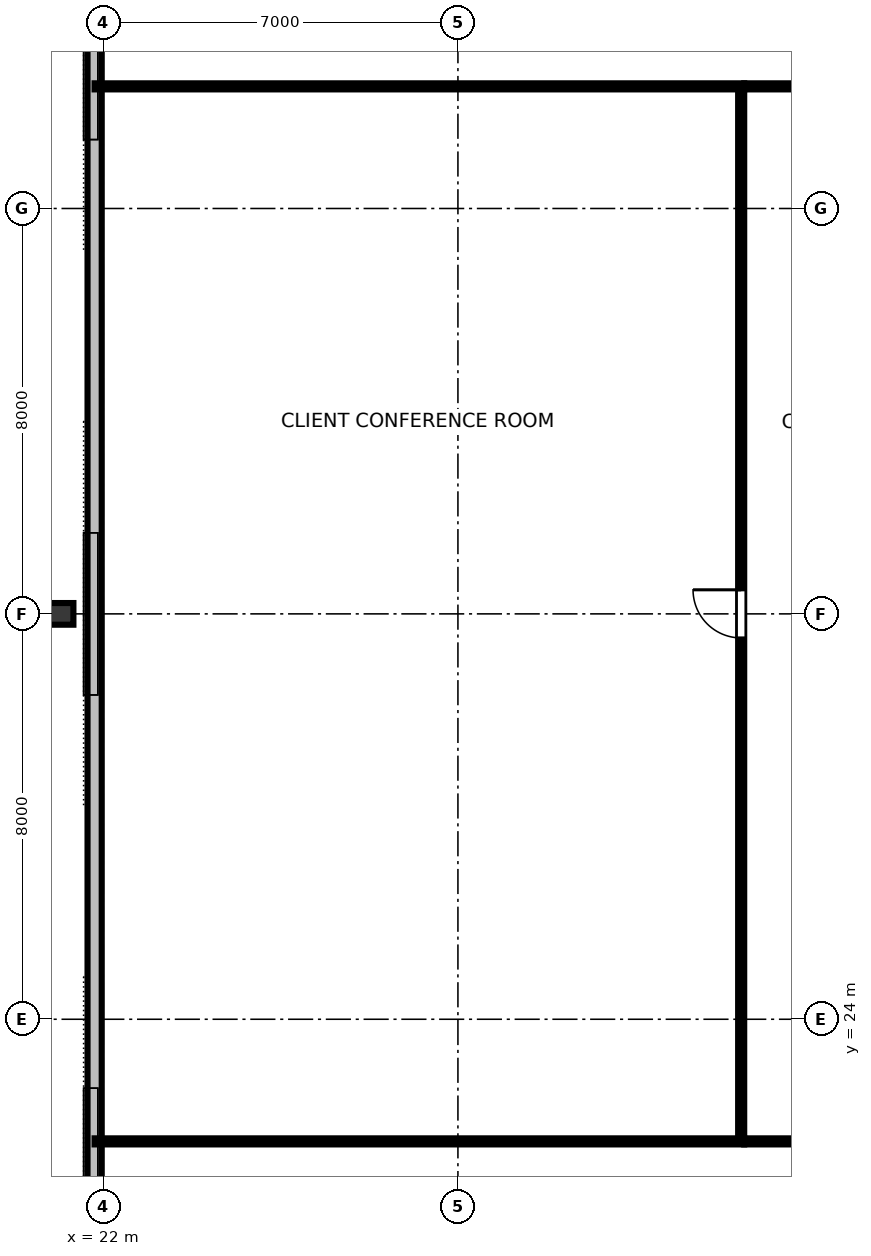
"""IFC4 building model, lengths in metres.
Left out: names, types, materials, properties, quantities, classifications, styles, units other than length and angle.
Written with IfcOpenShell. Run it as: python <this file> out.ifc"""

import sys

from ifc_helpers import new_model, si_unit, direction, frame, frame_2d, origin, origin_2d, place, context, subcontext, project, spatial, rectangle, i_section, extrude, element, fill, save


model = new_model("IFC4")
c1 = context("Model", 3, precision=1e-05, world=origin(), true_north=direction((0.0, 1.0)))
c2 = subcontext(c1, "Body", "Model", "MODEL_VIEW")
j1 = project(units=[si_unit("LENGTHUNIT", "METRE"), si_unit("PLANEANGLEUNIT", "RADIAN")], contexts=[c1])
p1 = place(None, origin())
s1 = spatial("IfcSite", under=j1, at=p1, CompositionType="ELEMENT")
p2 = place(p1, origin())
s2 = spatial("IfcBuilding", under=s1, at=p2, CompositionType="ELEMENT")
p3 = place(p2, frame((0.0, 0.0, 82.0)))
s3 = spatial("IfcBuildingStorey", under=s2, at=p3, CompositionType="ELEMENT", Elevation=82.0)
p4 = place(p3, frame((21.17, 32.0, 0.0), z_axis=(0.06599123705, 0.0, 0.997820202558), x_axis=(-0.997820202558, 0.0, 0.06599123705)))
e1 = element("IfcColumn", 1, at=p4, inside=s3, PredefinedType="COLUMN", context=c2, shape_type="SweptSolid", body=[
    extrude(i_section(OverallWidth=0.428, OverallDepth=0.483, WebThickness=0.051, FlangeThickness=0.082, FilletRadius=0.025, at=origin_2d()), origin(), (0.0, 0.0, 1.0), 3.285),
])
p5 = place(p3, frame((21.83, 49.34, 0.0), z_axis=(0.0, 0.0, 1.0), x_axis=(0.0, -1.0, 0.0)))
e2 = element("IfcWall", 2, at=p5, inside=s3, PredefinedType="STANDARD", context=c2, shape_type="SweptSolid", body=[
    extrude(rectangle(XDim=34.68, YDim=0.28, at=frame_2d((17.34, 0.0))), origin(), (0.0, 0.0, 1.0), 3.28),
])
p6 = place(p3, frame((34.65, 21.59, 0.0), z_axis=(0.0, 0.0, 1.0), x_axis=(1.0, 0.0, 0.0)))
e3 = element("IfcWall", 3, at=p6, inside=s3, PredefinedType="PARTITIONING", context=c2, shape_type="SweptSolid", body=[
    extrude(rectangle(XDim=22.7, YDim=0.12, at=frame_2d((11.35, 0.0))), origin(), (0.0, 0.0, 1.0), 2.56),
])
p7 = place(p6, frame((5.467, 0.0, 0.0)))
e4 = element("IfcOpeningElement", 4, at=p7, cuts=e3, PredefinedType="OPENING", context=c2, shape_type="SweptSolid", body=[
    extrude(rectangle(XDim=0.95, YDim=2.15, at=frame_2d((0.475, 1.075))), frame((0.0, 0.07, 0.0), z_axis=(0.0, -1.0, 0.0), x_axis=(1.0, 0.0, 0.0)), (0.0, 0.0, 1.0), 0.14),
])
p8 = place(p6, frame((14.188, 0.0, 0.0)))
e5 = element("IfcOpeningElement", 5, at=p8, cuts=e3, PredefinedType="OPENING", context=c2, shape_type="SweptSolid", body=[
    extrude(rectangle(XDim=0.95, YDim=2.15, at=frame_2d((0.475, 1.075))), frame((0.0, 0.07, 0.0), z_axis=(0.0, -1.0, 0.0), x_axis=(1.0, 0.0, 0.0)), (0.0, 0.0, 1.0), 0.14),
])
p9 = place(p6, frame((19.596, 0.0, 0.0)))
e6 = element("IfcOpeningElement", 6, at=p9, cuts=e3, PredefinedType="OPENING", context=c2, shape_type="SweptSolid", body=[
    extrude(rectangle(XDim=0.95, YDim=2.15, at=frame_2d((0.475, 1.075))), frame((0.0, 0.07, 0.0), z_axis=(0.0, -1.0, 0.0), x_axis=(1.0, 0.0, 0.0)), (0.0, 0.0, 1.0), 0.14),
])
p10 = place(p3, frame((34.65, 42.41, 0.0), z_axis=(0.0, 0.0, 1.0), x_axis=(1.0, 0.0, 0.0)))
e7 = element("IfcWall", 7, at=p10, inside=s3, PredefinedType="PARTITIONING", context=c2, shape_type="SweptSolid", body=[
    extrude(rectangle(XDim=22.7, YDim=0.12, at=frame_2d((11.35, 0.0))), origin(), (0.0, 0.0, 1.0), 2.56),
])
p11 = place(p10, frame((2.505, 0.0, 0.0)))
e8 = element("IfcOpeningElement", 8, at=p11, cuts=e7, PredefinedType="OPENING", context=c2, shape_type="SweptSolid", body=[
    extrude(rectangle(XDim=0.95, YDim=2.15, at=frame_2d((0.475, 1.075))), frame((0.0, 0.07, 0.0), z_axis=(0.0, -1.0, 0.0), x_axis=(1.0, 0.0, 0.0)), (0.0, 0.0, 1.0), 0.14),
])
p12 = place(p10, frame((7.357, 0.0, 0.0)))
e9 = element("IfcOpeningElement", 9, at=p12, cuts=e7, PredefinedType="OPENING", context=c2, shape_type="SweptSolid", body=[
    extrude(rectangle(XDim=0.95, YDim=2.15, at=frame_2d((0.475, 1.075))), frame((0.0, 0.07, 0.0), z_axis=(0.0, -1.0, 0.0), x_axis=(1.0, 0.0, 0.0)), (0.0, 0.0, 1.0), 0.14),
])
p13 = place(p10, frame((11.822, 0.0, 0.0)))
e10 = element("IfcOpeningElement", 10, at=p13, cuts=e7, PredefinedType="OPENING", context=c2, shape_type="SweptSolid", body=[
    extrude(rectangle(XDim=0.95, YDim=2.15, at=frame_2d((0.475, 1.075))), frame((0.0, 0.07, 0.0), z_axis=(0.0, -1.0, 0.0), x_axis=(1.0, 0.0, 0.0)), (0.0, 0.0, 1.0), 0.14),
])
p14 = place(p10, frame((15.641, 0.0, 0.0)))
e11 = element("IfcOpeningElement", 11, at=p14, cuts=e7, PredefinedType="OPENING", context=c2, shape_type="SweptSolid", body=[
    extrude(rectangle(XDim=0.95, YDim=2.15, at=frame_2d((0.475, 1.075))), frame((0.0, 0.07, 0.0), z_axis=(0.0, -1.0, 0.0), x_axis=(1.0, 0.0, 0.0)), (0.0, 0.0, 1.0), 0.14),
])
p15 = place(p10, frame((19.546, 0.0, 0.0)))
e12 = element("IfcOpeningElement", 12, at=p15, cuts=e7, PredefinedType="OPENING", context=c2, shape_type="SweptSolid", body=[
    extrude(rectangle(XDim=0.95, YDim=2.15, at=frame_2d((0.475, 1.075))), frame((0.0, 0.07, 0.0), z_axis=(0.0, -1.0, 0.0), x_axis=(1.0, 0.0, 0.0)), (0.0, 0.0, 1.0), 0.14),
])
p16 = place(p3, frame((34.59, 21.65, 0.0), z_axis=(0.0, 0.0, 1.0), x_axis=(0.0, 1.0, 0.0)))
e13 = element("IfcWall", 13, at=p16, inside=s3, PredefinedType="PARTITIONING", context=c2, shape_type="SweptSolid", body=[
    extrude(rectangle(XDim=20.7, YDim=0.12, at=frame_2d((10.35, 0.0))), origin(), (0.0, 0.0, 1.0), 2.56),
])
p17 = place(p16, frame((9.875, 0.0, 0.0)))
e14 = element("IfcOpeningElement", 14, at=p17, cuts=e13, PredefinedType="OPENING", context=c2, shape_type="SweptSolid", body=[
    extrude(rectangle(XDim=0.95, YDim=2.15, at=frame_2d((0.475, 1.075))), frame((0.0, 0.07, 0.0), z_axis=(0.0, -1.0, 0.0), x_axis=(1.0, 0.0, 0.0)), (0.0, 0.0, 1.0), 0.14),
])
for number, where, z_axis, x_axis in (
    (15, (34.65, 21.59, 0.0), (0.0, 0.0, 1.0), (-1.0, 0.0, 0.0)),
    (16, (34.65, 42.41, 0.0), (0.0, 0.0, 1.0), (-1.0, 0.0, 0.0)),
):
    element("IfcWall", number, at=place(p3, frame(where, z_axis=z_axis, x_axis=x_axis)), inside=s3, PredefinedType="PARTITIONING", context=c2, shape_type="SweptSolid", body=[
        extrude(rectangle(XDim=12.82, YDim=0.12, at=frame_2d((6.41, 0.0))), origin(), (0.0, 0.0, 1.0), 2.56),
    ])
p18 = place(p17, origin())
e17 = element("IfcDoor", 17, at=p18, inside=s3, OperationType="SINGLE_SWING_RIGHT", PredefinedType="DOOR", context=c2, shape_type="SweptSolid", body=[
    extrude(rectangle(XDim=0.95, YDim=2.15, at=frame_2d((0.475, 1.075))), frame((0.0, 0.025, 0.0), z_axis=(0.0, -1.0, 0.0), x_axis=(1.0, 0.0, 0.0)), (0.0, 0.0, 1.0), 0.05),
])
fill(e14, e17)
save(model, sys.argv[1])
